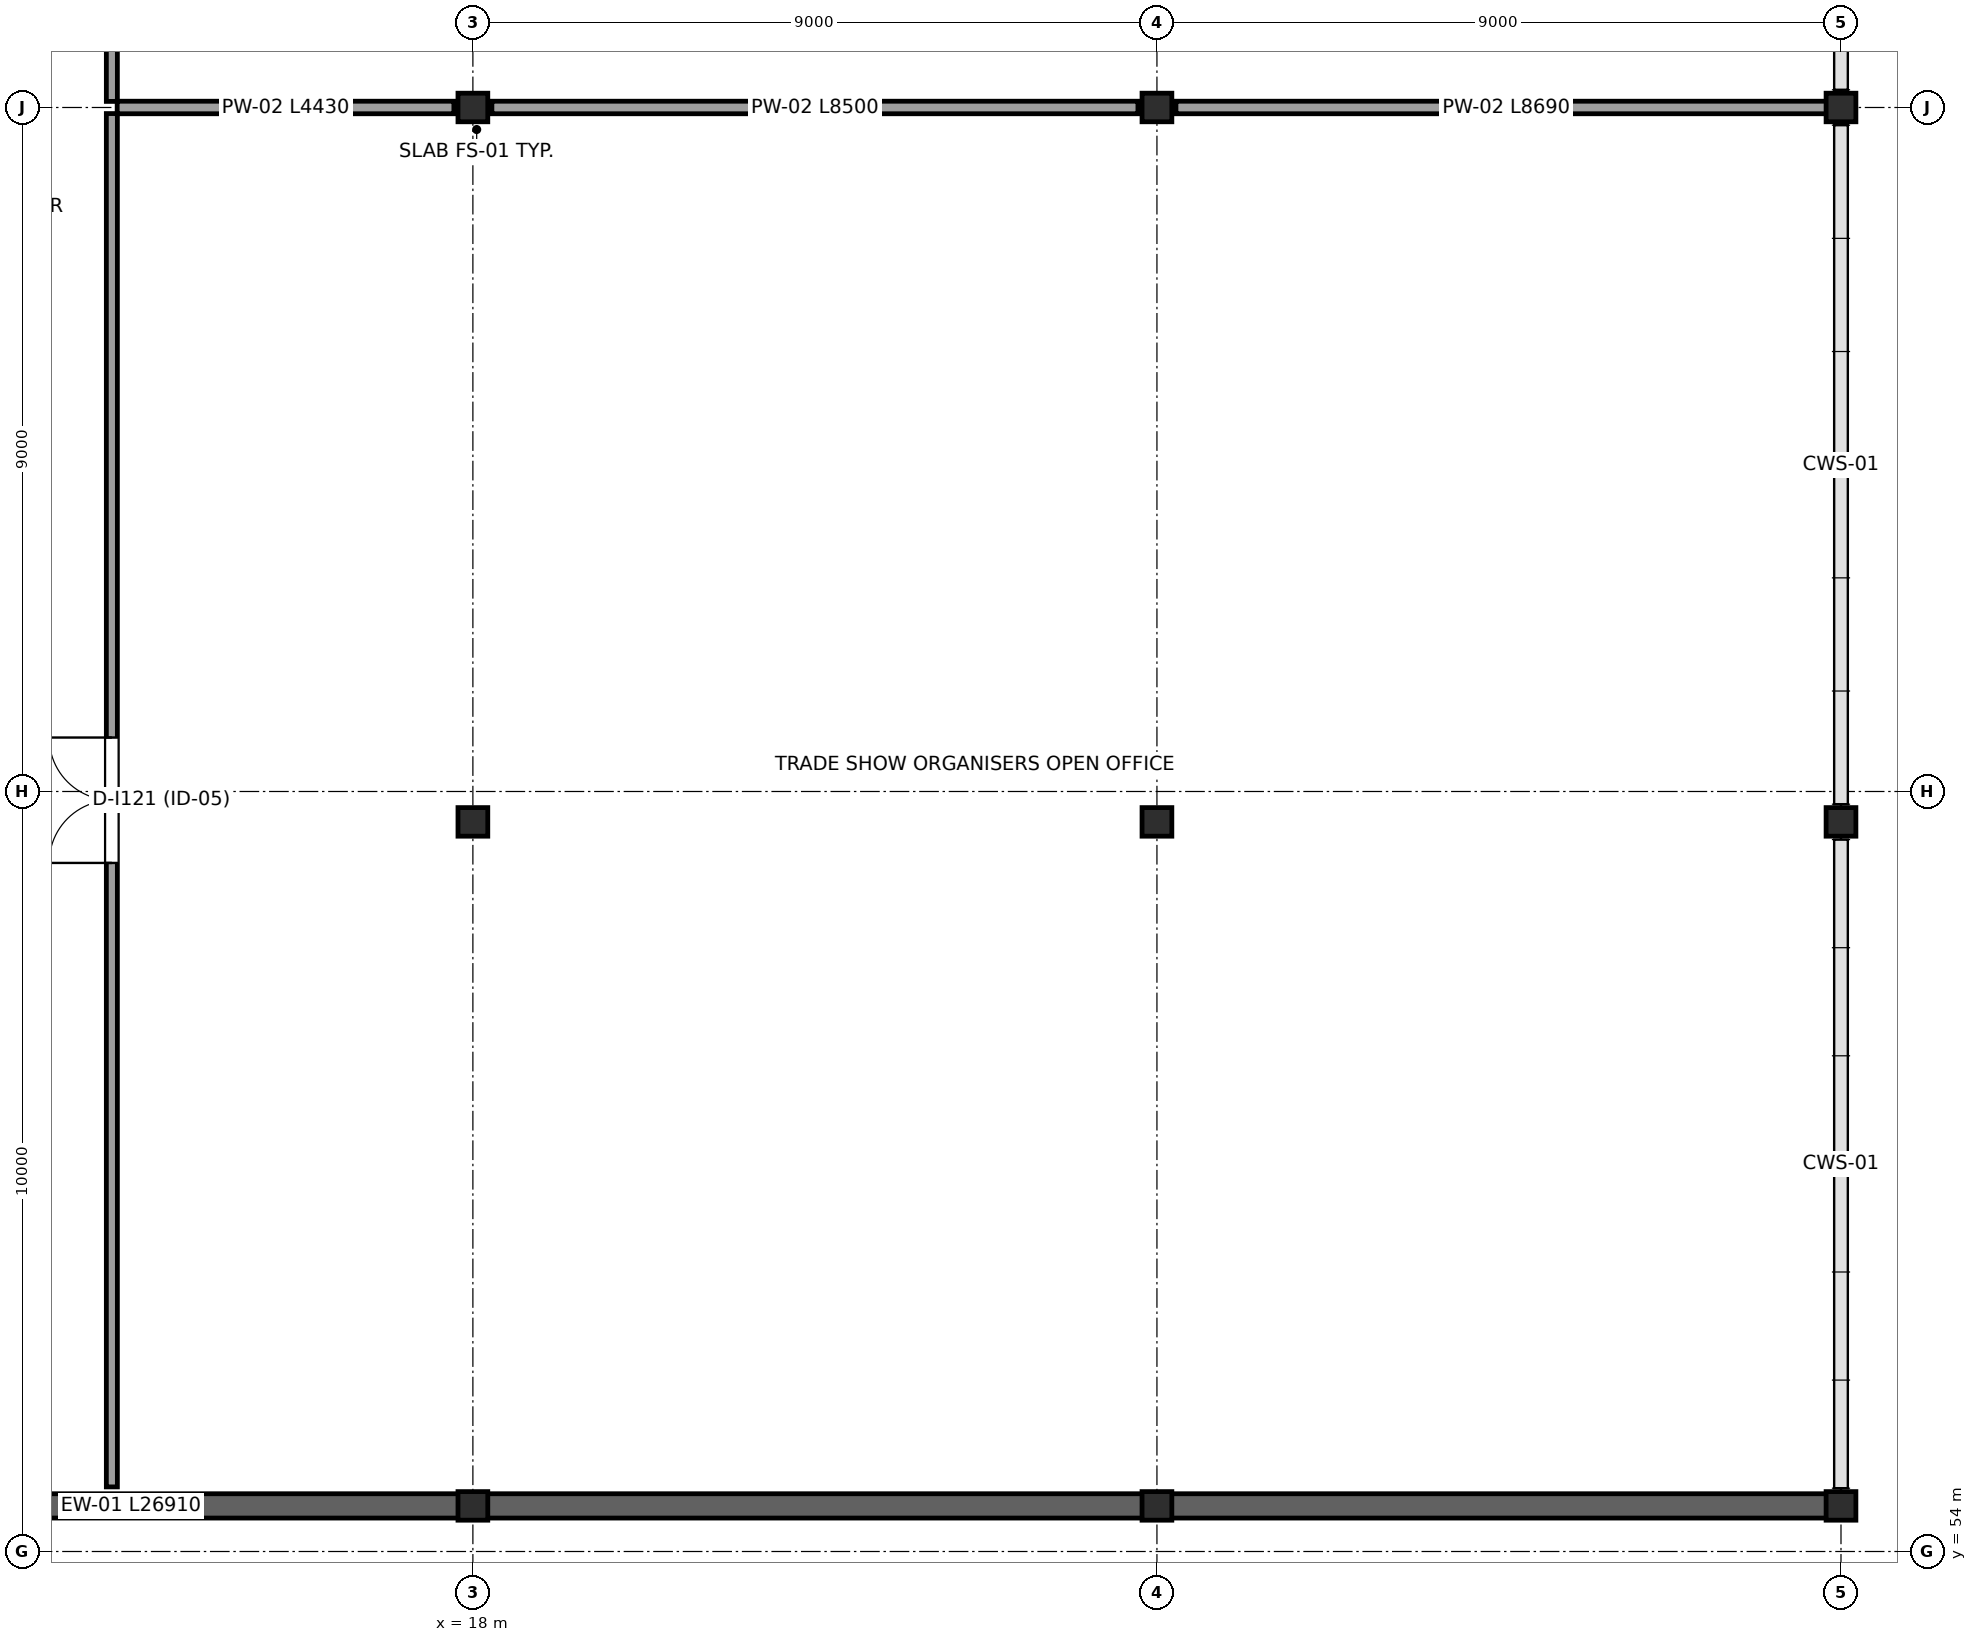
"""IFC4 building model, lengths in metres.
Left out: names, types, materials, properties, quantities, classifications, styles, units other than length and angle.
Written with IfcOpenShell. Run it as: python <this file> out.ifc"""

import sys

from ifc_helpers import new_model, si_unit, direction, frame, frame_2d, origin, origin_2d, place, context, subcontext, project, spatial, rectangle, i_section, extrude, element, fill, save


model = new_model("IFC4")
c1 = context("Model", 3, precision=1e-05, world=origin(), true_north=direction((0.0, 1.0)))
c2 = subcontext(c1, "Body", "Model", "MODEL_VIEW")
j1 = project(units=[si_unit("LENGTHUNIT", "METRE"), si_unit("PLANEANGLEUNIT", "RADIAN")], contexts=[c1])
p1 = place(None, origin())
s1 = spatial("IfcSite", under=j1, at=p1, CompositionType="ELEMENT")
p2 = place(p1, origin())
s2 = spatial("IfcBuilding", under=s1, at=p2, CompositionType="ELEMENT")
p3 = place(p2, frame((0.0, 0.0, 16.5)))
s3 = spatial("IfcBuildingStorey", under=s2, at=p3, CompositionType="ELEMENT", Elevation=16.5)
for number, where, z_axis, x_axis in (
    (1, (18.0, 54.6, 0.0), (0.0, 0.0, 1.0), (1.0, 0.0, 0.0)),
    (2, (18.0, 63.6, 0.0), (0.0, 0.0, 1.0), (1.0, 0.0, 0.0)),
    (3, (18.0, 73.0, 0.0), (0.0, 0.0, 1.0), (1.0, 0.0, 0.0)),
    (4, (27.0, 54.6, 0.0), (0.0, 0.0, 1.0), (1.0, 0.0, 0.0)),
    (5, (27.0, 63.6, 0.0), (0.0, 0.0, 1.0), (1.0, 0.0, 0.0)),
    (6, (27.0, 73.0, 0.0), (0.0, 0.0, 1.0), (1.0, 0.0, 0.0)),
    (7, (36.0, 54.6, 0.0), (0.0, 0.0, 1.0), (1.0, 0.0, 0.0)),
    (8, (36.0, 63.6, 0.0), (0.0, 0.0, 1.0), (1.0, 0.0, 0.0)),
    (9, (36.0, 73.0, 0.0), (0.0, 0.0, 1.0), (1.0, 0.0, 0.0)),
):
    element("IfcColumn", number, at=place(p3, frame(where, z_axis=z_axis, x_axis=x_axis)), inside=s3, PredefinedType="COLUMN", context=c2, shape_type="SweptSolid", body=[
        extrude(i_section(OverallWidth=0.392, OverallDepth=0.376, WebThickness=0.017, FlangeThickness=0.028, at=origin_2d()), origin(), (0.0, 0.0, 1.0), 4.5),
    ])
for number, where, z_axis, x_axis in (
    (10, (17.985, 54.6, 0.0), (0.0, 0.0, 1.0), (-1.0, 0.0, 0.0)),
    (11, (26.985, 54.6, 0.0), (0.0, 0.0, 1.0), (-1.0, 0.0, 0.0)),
    (12, (35.985, 54.6, 0.0), (0.0, 0.0, 1.0), (-1.0, 0.0, 0.0)),
):
    element("IfcWall", number, at=place(p3, frame(where, z_axis=z_axis, x_axis=x_axis)), inside=s3, PredefinedType="STANDARD", context=c2, shape_type="SweptSolid", body=[
        extrude(rectangle(XDim=8.97, YDim=0.32, at=frame_2d((4.485, 0.0))), origin(), (0.0, 0.0, 1.0), 4.28),
    ])
p4 = place(p3, frame((13.25, 54.85, 0.0), z_axis=(0.0, 0.0, 1.0), x_axis=(0.0, 1.0, 0.0)))
e13 = element("IfcWall", 13, at=p4, inside=s3, PredefinedType="PARTITIONING", context=c2, shape_type="SweptSolid", body=[
    extrude(rectangle(XDim=18.07, YDim=0.145, at=frame_2d((9.035, 0.0))), origin(), (0.0, 0.0, 1.0), 3.5),
])
p5 = place(p4, frame((8.21, 0.0, 0.0)))
e14 = element("IfcOpeningElement", 14, at=p5, cuts=e13, PredefinedType="OPENING", context=c2, shape_type="SweptSolid", body=[
    extrude(rectangle(XDim=1.65, YDim=2.25, at=frame_2d((0.825, 1.125))), frame((0.0, 0.083, 0.0), z_axis=(0.0, -1.0, 0.0), x_axis=(1.0, 0.0, 0.0)), (0.0, 0.0, 1.0), 0.165),
])
p6 = place(p3, frame((13.25, 73.08, 0.0), z_axis=(0.0, 0.0, 1.0), x_axis=(0.0, 1.0, 0.0)))
e15 = element("IfcWall", 15, at=p6, inside=s3, PredefinedType="PARTITIONING", context=c2, shape_type="SweptSolid", body=[
    extrude(rectangle(XDim=13.14, YDim=0.145, at=frame_2d((6.57, 0.0))), origin(), (0.0, 0.0, 1.0), 3.5),
])
p7 = place(p6, frame((5.93, 0.0, 0.0)))
e16 = element("IfcOpeningElement", 16, at=p7, cuts=e15, PredefinedType="OPENING", context=c2, shape_type="SweptSolid", body=[
    extrude(rectangle(XDim=1.28, YDim=2.34, at=frame_2d((0.64, 1.17))), frame((0.0, 0.083, 0.0), z_axis=(0.0, -1.0, 0.0), x_axis=(1.0, 0.0, 0.0)), (0.0, 0.0, 1.0), 0.165),
])
p8 = place(p3, frame((13.32, 73.0, 0.0), z_axis=(0.0, 0.0, 1.0), x_axis=(1.0, 0.0, 0.0)))
e17 = element("IfcWall", 17, at=p8, inside=s3, PredefinedType="PARTITIONING", context=c2, shape_type="SweptSolid", body=[
    extrude(rectangle(XDim=4.43, YDim=0.165, at=frame_2d((2.215, 0.0))), origin(), (0.0, 0.0, 1.0), 3.5),
])
p9 = place(p3, frame((18.25, 73.0, 0.0), z_axis=(0.0, 0.0, 1.0), x_axis=(1.0, 0.0, 0.0)))
e18 = element("IfcWall", 18, at=p9, inside=s3, PredefinedType="PARTITIONING", context=c2, shape_type="SweptSolid", body=[
    extrude(rectangle(XDim=8.5, YDim=0.165, at=frame_2d((4.25, 0.0))), origin(), (0.0, 0.0, 1.0), 3.5),
])
p10 = place(p3, frame((27.25, 73.0, 0.0), z_axis=(0.0, 0.0, 1.0), x_axis=(1.0, 0.0, 0.0)))
e19 = element("IfcWall", 19, at=p10, inside=s3, PredefinedType="PARTITIONING", context=c2, shape_type="SweptSolid", body=[
    extrude(rectangle(XDim=8.69, YDim=0.165, at=frame_2d((4.345, 0.0))), origin(), (0.0, 0.0, 1.0), 3.5),
])
p11 = place(p5, origin())
e20 = element("IfcDoor", 20, at=p11, inside=s3, OperationType="DOUBLE_DOOR_SINGLE_SWING", PredefinedType="DOOR", context=c2, shape_type="SweptSolid", body=[
    extrude(rectangle(XDim=1.65, YDim=2.25, at=frame_2d((0.825, 1.125))), frame((0.0, 0.025, 0.0), z_axis=(0.0, -1.0, 0.0), x_axis=(1.0, 0.0, 0.0)), (0.0, 0.0, 1.0), 0.05),
])
fill(e14, e20)
save(model, sys.argv[1])
